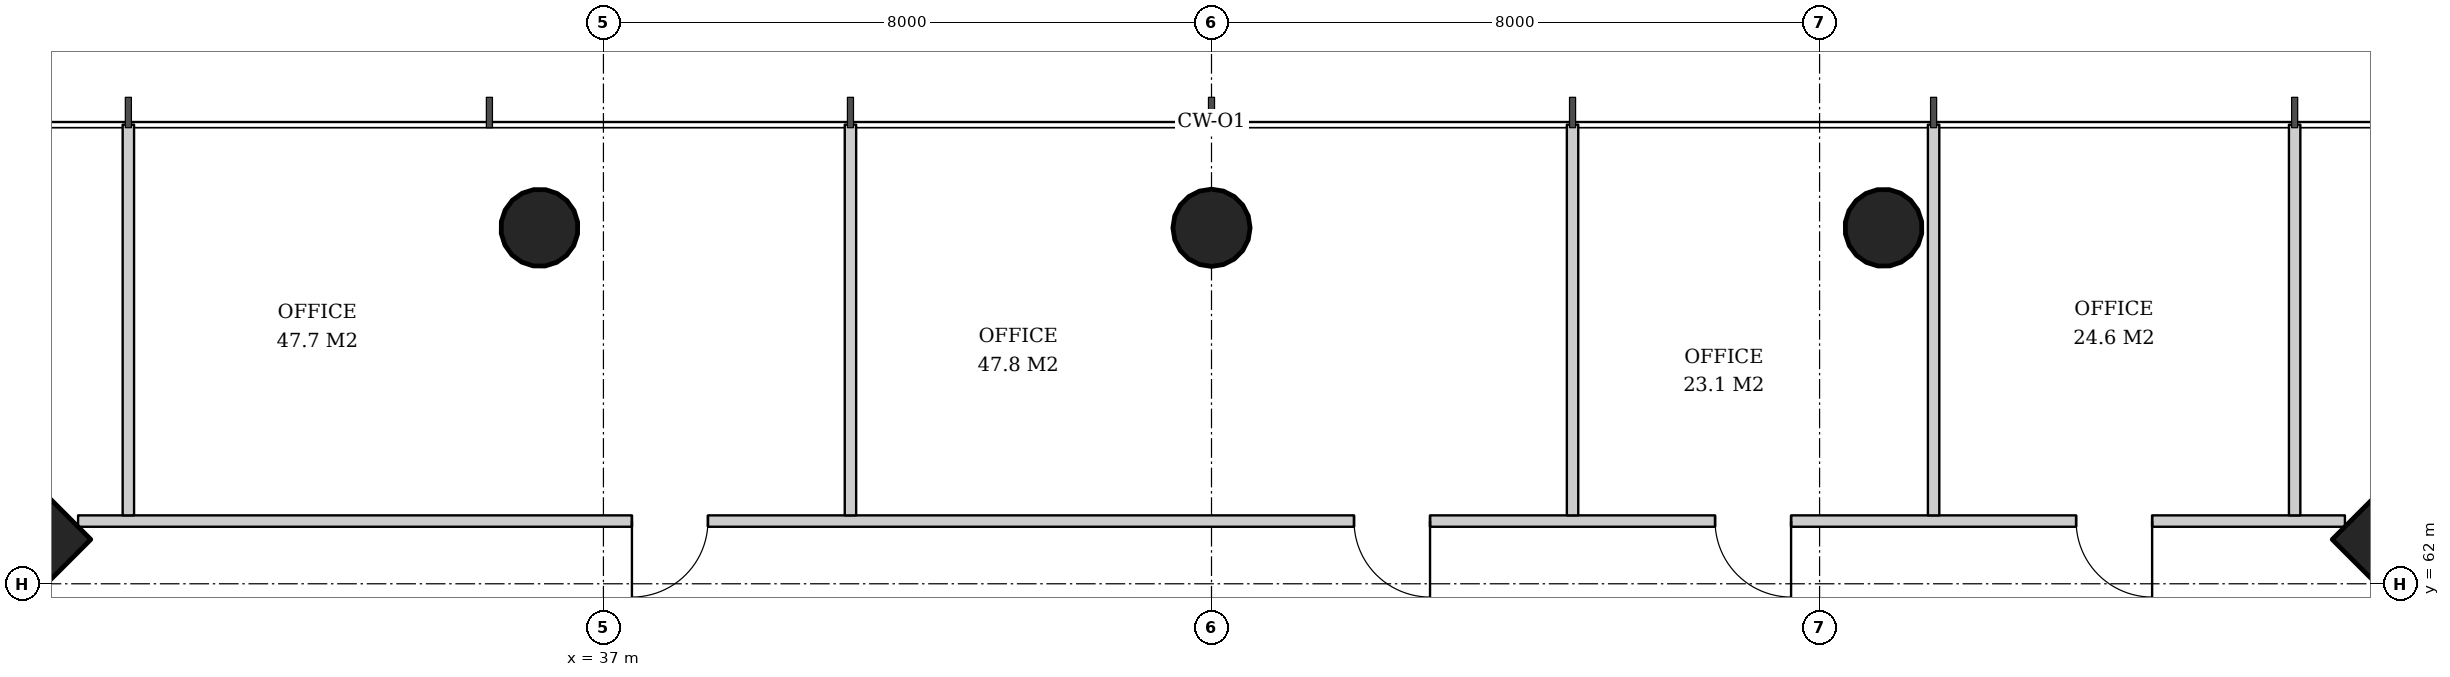
"""IFC4 building model, lengths in metres.
Left out: names, types, materials, properties, quantities, classifications, styles, units other than length and angle.
Written with IfcOpenShell. Run it as: python <this file> out.ifc"""

import sys

from ifc_helpers import new_model, si_unit, direction, frame, frame_2d, origin, origin_2d, place, context, subcontext, project, spatial, rectangle, hollow_circle, extrude, element, fill, save


model = new_model("IFC4")
c1 = context("Model", 3, precision=1e-05, world=origin(), true_north=direction((0.0, 1.0)))
c2 = subcontext(c1, "Body", "Model", "MODEL_VIEW")
j1 = project(units=[si_unit("LENGTHUNIT", "METRE"), si_unit("PLANEANGLEUNIT", "RADIAN")], contexts=[c1])
p1 = place(None, origin())
s1 = spatial("IfcSite", under=j1, at=p1, CompositionType="ELEMENT")
p2 = place(p1, origin())
s2 = spatial("IfcBuilding", under=s1, at=p2, CompositionType="ELEMENT")
p3 = place(p2, frame((0.0, 0.0, 123.6)))
s3 = spatial("IfcBuildingStorey", under=s2, at=p3, CompositionType="ELEMENT", Elevation=123.6)
for number, where, z_axis, x_axis in (
    (1, (61.621, 62.621, 0.0), (-0.032, -0.032, 0.999), (0.707, -0.707, 0.0)),
    (2, (28.379, 62.621, 0.0), (0.032, -0.032, 0.999), (0.707, 0.707, 0.0)),
):
    element("IfcColumn", number, at=place(p3, frame(where, z_axis=z_axis, x_axis=x_axis)), inside=s3, PredefinedType="COLUMN", context=c2, shape_type="SweptSolid", body=[
        extrude(rectangle(XDim=2.6, YDim=2.6, at=origin_2d()), origin(), (0.0, 0.0, 1.0), 3.804),
    ])
p4 = place(p3, frame((53.861, 66.721, 0.0), z_axis=(-0.015924069971, -0.031912349901, 0.999363810591), x_axis=(0.894786976326, -0.446493300058, 0.0)))
e3 = element("IfcColumn", 3, at=p4, inside=s3, PredefinedType="COLUMN", context=c2, shape_type="SweptSolid", body=[
    extrude(hollow_circle(Radius=0.508, WallThickness=0.04, at=origin_2d()), origin(), (0.0, 0.0, 1.0), 3.802),
])
p5 = place(p3, frame((45.0, 66.721, 0.0), z_axis=(0.0, -0.031916396774, 0.999490542035), x_axis=(1.0, 0.0, 0.0)))
e4 = element("IfcColumn", 4, at=p5, inside=s3, PredefinedType="COLUMN", context=c2, shape_type="SweptSolid", body=[
    extrude(hollow_circle(Radius=0.508, WallThickness=0.04, at=origin_2d()), origin(), (0.0, 0.0, 1.0), 3.802),
])
p6 = place(p3, frame((36.139, 66.721, 0.0), z_axis=(0.015924069971, -0.031912349901, 0.999363810591), x_axis=(0.894786976326, 0.446493300058, 0.0)))
e5 = element("IfcColumn", 5, at=p6, inside=s3, PredefinedType="COLUMN", context=c2, shape_type="SweptSolid", body=[
    extrude(hollow_circle(Radius=0.508, WallThickness=0.04, at=origin_2d()), origin(), (0.0, 0.0, 1.0), 3.802),
])
p7 = place(p3, frame((59.912, 62.825, 0.0), z_axis=(0.0, 0.0, 1.0), x_axis=(-1.0, 0.0, 0.0)))
e6 = element("IfcWall", 6, at=p7, inside=s3, PredefinedType="PARTITIONING", context=c2, shape_type="SweptSolid", body=[
    extrude(rectangle(XDim=29.823, YDim=0.15, at=frame_2d((14.912, 0.0))), origin(), (0.0, 0.0, 1.0), 2.72),
])
p8 = place(p7, frame((2.537, 0.0, 0.0)))
e7 = element("IfcOpeningElement", 7, at=p8, cuts=e6, PredefinedType="OPENING", context=c2, shape_type="SweptSolid", body=[
    extrude(rectangle(XDim=1.0, YDim=2.1, at=frame_2d((0.5, 1.05))), frame((0.0, 0.085, 0.0), z_axis=(0.0, -1.0, 0.0), x_axis=(1.0, 0.0, 0.0)), (0.0, 0.0, 1.0), 0.17),
])
p9 = place(p7, frame((7.287, 0.0, 0.0)))
e8 = element("IfcOpeningElement", 8, at=p9, cuts=e6, PredefinedType="OPENING", context=c2, shape_type="SweptSolid", body=[
    extrude(rectangle(XDim=1.0, YDim=2.1, at=frame_2d((0.5, 1.05))), frame((0.0, 0.085, 0.0), z_axis=(0.0, -1.0, 0.0), x_axis=(1.0, 0.0, 0.0)), (0.0, 0.0, 1.0), 0.17),
])
p10 = place(p7, frame((12.037, 0.0, 0.0)))
e9 = element("IfcOpeningElement", 9, at=p10, cuts=e6, PredefinedType="OPENING", context=c2, shape_type="SweptSolid", body=[
    extrude(rectangle(XDim=1.0, YDim=2.1, at=frame_2d((0.5, 1.05))), frame((0.0, 0.085, 0.0), z_axis=(0.0, -1.0, 0.0), x_axis=(1.0, 0.0, 0.0)), (0.0, 0.0, 1.0), 0.17),
])
p11 = place(p7, frame((21.537, 0.0, 0.0)))
e10 = element("IfcOpeningElement", 10, at=p11, cuts=e6, PredefinedType="OPENING", context=c2, shape_type="SweptSolid", body=[
    extrude(rectangle(XDim=1.0, YDim=2.1, at=frame_2d((0.5, 1.05))), frame((0.0, 0.085, 0.0), z_axis=(0.0, -1.0, 0.0), x_axis=(1.0, 0.0, 0.0)), (0.0, 0.0, 1.0), 0.17),
])
for number, where, z_axis, x_axis in (
    (11, (59.25, 62.9, 0.0), (0.0, 0.0, 1.0), (0.0, 1.0, 0.0)),
    (12, (54.5, 62.9, 0.0), (0.0, 0.0, 1.0), (0.0, 1.0, 0.0)),
    (13, (49.75, 62.9, 0.0), (0.0, 0.0, 1.0), (0.0, 1.0, 0.0)),
    (14, (40.25, 62.9, 0.0), (0.0, 0.0, 1.0), (0.0, 1.0, 0.0)),
    (15, (30.75, 62.9, 0.0), (0.0, 0.0, 1.0), (0.0, 1.0, 0.0)),
):
    element("IfcWall", number, at=place(p3, frame(where, z_axis=z_axis, x_axis=x_axis)), inside=s3, PredefinedType="PARTITIONING", context=c2, shape_type="SweptSolid", body=[
        extrude(rectangle(XDim=5.14, YDim=0.15, at=frame_2d((2.57, 0.0))), origin(), (0.0, 0.0, 1.0), 2.82),
    ])
p12 = place(p8, origin())
e16 = element("IfcDoor", 16, at=p12, inside=s3, OperationType="SINGLE_SWING_LEFT", PredefinedType="DOOR", context=c2, shape_type="SweptSolid", body=[
    extrude(rectangle(XDim=1.0, YDim=2.1, at=frame_2d((0.5, 1.05))), frame((0.0, 0.025, 0.0), z_axis=(0.0, -1.0, 0.0), x_axis=(1.0, 0.0, 0.0)), (0.0, 0.0, 1.0), 0.05),
])
fill(e7, e16)
p13 = place(p9, origin())
e17 = element("IfcDoor", 17, at=p13, inside=s3, OperationType="SINGLE_SWING_LEFT", PredefinedType="DOOR", context=c2, shape_type="SweptSolid", body=[
    extrude(rectangle(XDim=1.0, YDim=2.1, at=frame_2d((0.5, 1.05))), frame((0.0, 0.025, 0.0), z_axis=(0.0, -1.0, 0.0), x_axis=(1.0, 0.0, 0.0)), (0.0, 0.0, 1.0), 0.05),
])
fill(e8, e17)
p14 = place(p10, origin())
e18 = element("IfcDoor", 18, at=p14, inside=s3, OperationType="SINGLE_SWING_LEFT", PredefinedType="DOOR", context=c2, shape_type="SweptSolid", body=[
    extrude(rectangle(XDim=1.0, YDim=2.1, at=frame_2d((0.5, 1.05))), frame((0.0, 0.025, 0.0), z_axis=(0.0, -1.0, 0.0), x_axis=(1.0, 0.0, 0.0)), (0.0, 0.0, 1.0), 0.05),
])
fill(e9, e18)
p15 = place(p11, origin())
e19 = element("IfcDoor", 19, at=p15, inside=s3, OperationType="SINGLE_SWING_RIGHT", PredefinedType="DOOR", context=c2, shape_type="SweptSolid", body=[
    extrude(rectangle(XDim=1.0, YDim=2.1, at=frame_2d((0.5, 1.05))), frame((0.0, 0.025, 0.0), z_axis=(0.0, -1.0, 0.0), x_axis=(1.0, 0.0, 0.0)), (0.0, 0.0, 1.0), 0.05),
])
fill(e10, e19)
save(model, sys.argv[1])
